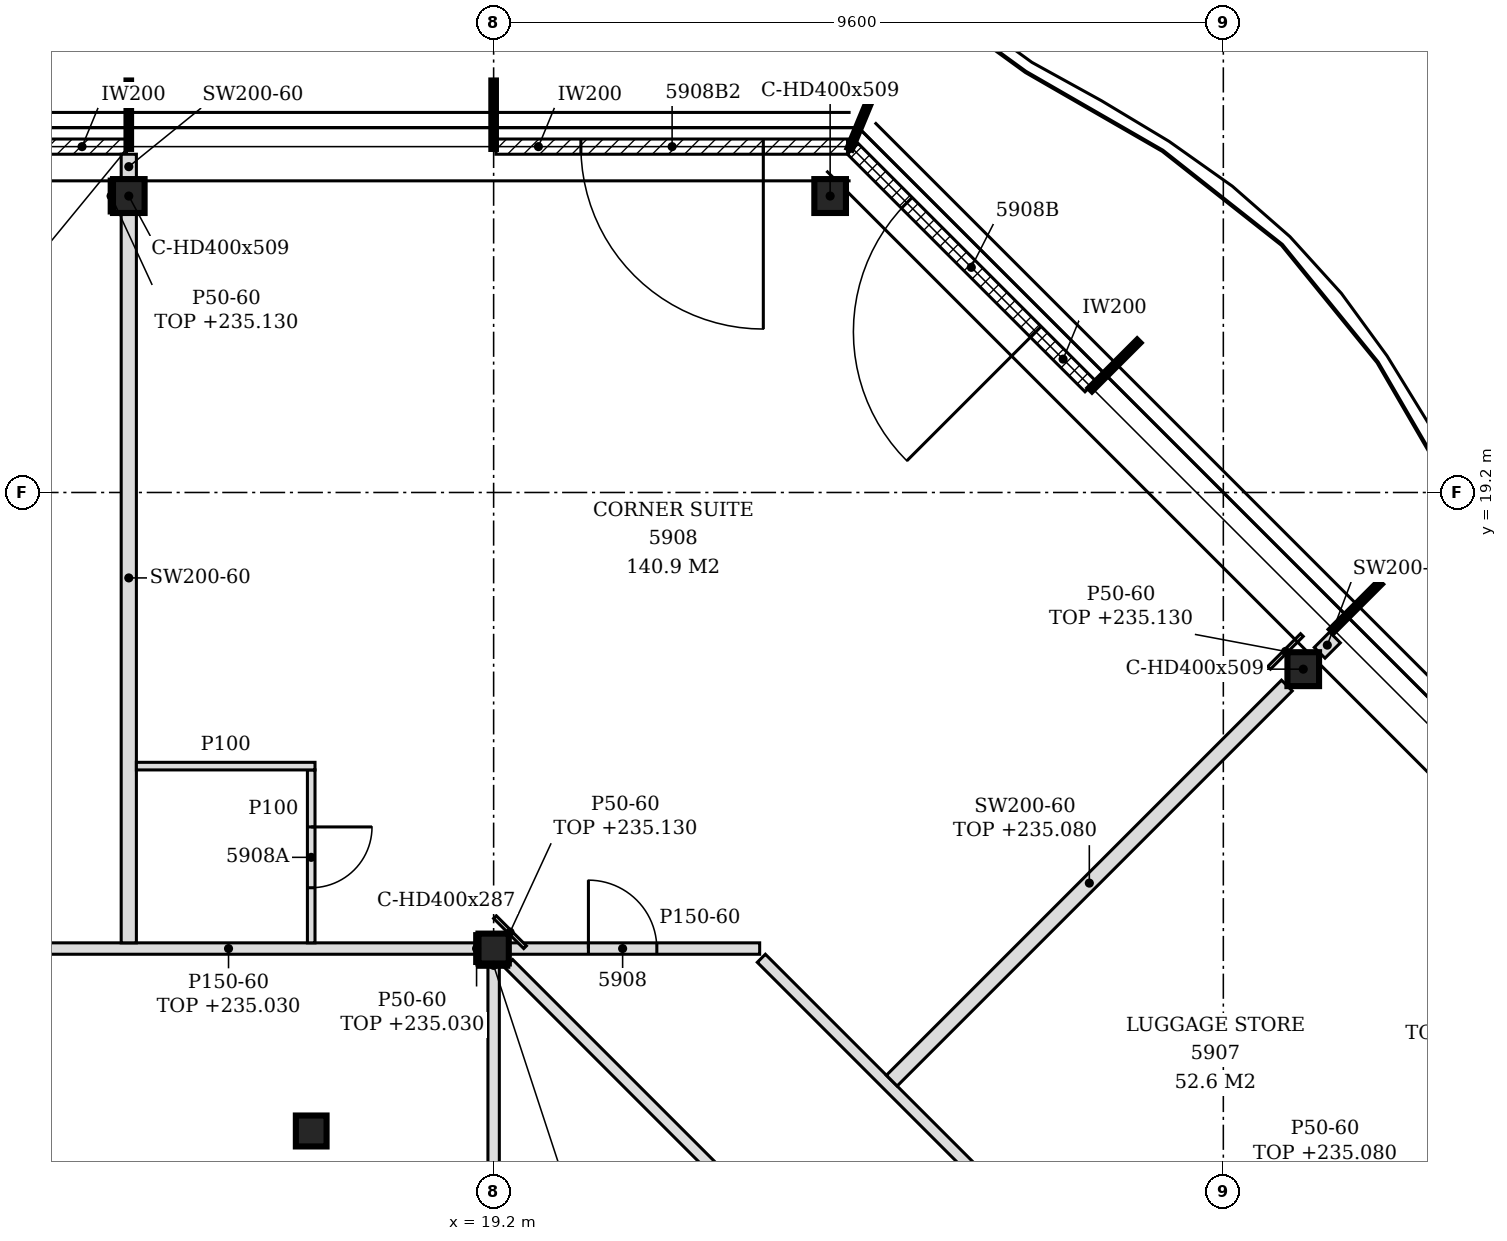
"""IFC4 building model, lengths in metres.
Left out: names, types, materials, properties, quantities, classifications, styles, units other than length and angle.
Written with IfcOpenShell. Run it as: python <this file> out.ifc"""

import sys

from ifc_helpers import new_model, si_unit, direction, frame, frame_2d, origin, origin_2d, place, context, subcontext, project, spatial, polyline, rectangle, i_section, outline, extrude, element, fill, save


model = new_model("IFC4")
c1 = context("Model", 3, precision=1e-05, world=origin(), true_north=direction((0.0, 1.0)))
c2 = subcontext(c1, "Body", "Model", "MODEL_VIEW")
j1 = project(units=[si_unit("LENGTHUNIT", "METRE"), si_unit("PLANEANGLEUNIT", "RADIAN")], contexts=[c1])
p1 = place(None, origin())
s1 = spatial("IfcSite", under=j1, at=p1, CompositionType="ELEMENT")
p2 = place(p1, origin())
s2 = spatial("IfcBuilding", under=s1, at=p2, CompositionType="ELEMENT")
p3 = place(p2, frame((0.0, 0.0, 232.2)))
s3 = spatial("IfcBuildingStorey", under=s2, at=p3, CompositionType="ELEMENT", Elevation=232.2)
for number, where, z_axis, x_axis in (
    (1, (29.852, 16.876, -0.15), (0.0, 0.0, 1.0), (1.0, 0.0, 0.0)),
    (2, (23.627, 23.1, -0.15), (0.0, 0.0, 1.0), (1.0, 0.0, 0.0)),
    (3, (14.4, 23.1, -0.15), (0.0, 0.0, 1.0), (1.0, 0.0, 0.0)),
):
    element("IfcColumn", number, at=place(p3, frame(where, z_axis=z_axis, x_axis=x_axis)), inside=s3, PredefinedType="COLUMN", context=c2, shape_type="SweptSolid", body=[
        extrude(i_section(OverallWidth=0.416, OverallDepth=0.446, WebThickness=0.039, FlangeThickness=0.063, FilletRadius=0.015, at=origin_2d()), origin(), (0.0, 0.0, 1.0), 3.6),
    ])
p4 = place(p3, frame((19.2, 13.2, -0.15), z_axis=(0.0, 0.0, 1.0), x_axis=(1.0, 0.0, 0.0)))
e4 = element("IfcColumn", 4, at=p4, inside=s3, PredefinedType="COLUMN", context=c2, shape_type="SweptSolid", body=[
    extrude(i_section(OverallWidth=0.399, OverallDepth=0.393, WebThickness=0.023, FlangeThickness=0.037, FilletRadius=0.015, at=origin_2d()), origin(), (0.0, 0.0, 1.0), 3.6),
])
p5 = place(p3, frame((16.8, 10.8, -0.15), z_axis=(0.0, 0.0, 1.0), x_axis=(1.0, 0.0, 0.0)))
e5 = element("IfcColumn", 5, at=p5, inside=s3, PredefinedType="COLUMN", context=c2, shape_type="SweptSolid", body=[
    extrude(i_section(OverallWidth=0.404, OverallDepth=0.407, WebThickness=0.027, FlangeThickness=0.044, FilletRadius=0.015, at=origin_2d()), origin(), (0.0, 0.0, 1.0), 3.6),
])
p6 = place(p3, frame((27.051, 20.596, 0.0), z_axis=(0.0, 0.0, 1.0), x_axis=(-0.707106781187, 0.707106781187, 0.0)))
e6 = element("IfcWall", 6, at=p6, inside=s3, PredefinedType="NOTDEFINED", context=c2, shape_type="SweptSolid", body=[
    extrude(rectangle(XDim=4.421, YDim=0.2, at=frame_2d((2.21, 0.0))), origin(), (0.0, 0.0, 1.0), 3.45),
])
p7 = place(p6, frame((1.015, 0.0, 0.0)))
e7 = element("IfcOpeningElement", 7, at=p7, cuts=e6, PredefinedType="OPENING", context=c2, shape_type="SweptSolid", body=[
    extrude(rectangle(XDim=2.4, YDim=2.4, at=frame_2d((1.2, 1.2))), frame((0.0, 0.11, 0.0), z_axis=(0.0, -1.0, 0.0), x_axis=(1.0, 0.0, 0.0)), (0.0, 0.0, 1.0), 0.22),
])
p8 = place(p3, frame((23.856, 23.75, 0.0), z_axis=(0.0, 0.0, 1.0), x_axis=(-1.0, 0.0, 0.0)))
e8 = element("IfcWall", 8, at=p8, inside=s3, PredefinedType="NOTDEFINED", context=c2, shape_type="SweptSolid", body=[
    extrude(rectangle(XDim=4.626, YDim=0.2, at=frame_2d((2.313, 0.0))), origin(), (0.0, 0.0, 1.0), 3.45),
])
p9 = place(p8, frame((1.108, 0.0, 0.0)))
e9 = element("IfcOpeningElement", 9, at=p9, cuts=e8, PredefinedType="OPENING", context=c2, shape_type="SweptSolid", body=[
    extrude(rectangle(XDim=2.4, YDim=2.4, at=frame_2d((1.2, 1.2))), frame((0.0, 0.11, 0.0), z_axis=(0.0, -1.0, 0.0), x_axis=(1.0, 0.0, 0.0)), (0.0, 0.0, 1.0), 0.22),
])
p10 = place(p3, frame((14.37, 23.75, 0.0), z_axis=(0.0, 0.0, 1.0), x_axis=(-1.0, 0.0, 0.0)))
e10 = element("IfcWall", 10, at=p10, inside=s3, PredefinedType="NOTDEFINED", context=c2, shape_type="SweptSolid", body=[
    extrude(rectangle(XDim=4.74, YDim=0.2, at=frame_2d((2.37, 0.0))), origin(), (0.0, 0.0, 1.0), 3.45),
])
p11 = place(p10, frame((1.17, 0.0, 0.0)))
e11 = element("IfcOpeningElement", 11, at=p11, cuts=e10, PredefinedType="OPENING", context=c2, shape_type="SweptSolid", body=[
    extrude(rectangle(XDim=2.4, YDim=2.4, at=frame_2d((1.2, 1.2))), frame((0.0, 0.11, 0.0), z_axis=(0.0, -1.0, 0.0), x_axis=(1.0, 0.0, 0.0)), (0.0, 0.0, 1.0), 0.22),
])
p12 = place(p3, frame((37.072, -1.278, 0.0), z_axis=(0.0, 0.0, 1.0), x_axis=(-0.707106781187, 0.707106781187, 0.0)))
e12 = element("IfcWall", 12, at=p12, inside=s3, PredefinedType="PARTITIONING", context=c2, shape_type="SweptSolid", body=[
    extrude(rectangle(XDim=20.294, YDim=0.15, at=frame_2d((10.147, 0.0))), origin(), (0.0, 0.0, 1.0), 2.88),
])
p13 = place(p12, frame((3.824, 0.0, 0.0)))
e13 = element("IfcOpeningElement", 13, at=p13, cuts=e12, PredefinedType="OPENING", context=c2, shape_type="SweptSolid", body=[
    extrude(rectangle(XDim=0.9, YDim=2.1, at=frame_2d((0.45, 1.05))), frame((0.0, 0.085, 0.0), z_axis=(0.0, -1.0, 0.0), x_axis=(1.0, 0.0, 0.0)), (0.0, 0.0, 1.0), 0.17),
])
p14 = place(p12, frame((10.042, 0.0, 0.0)))
e14 = element("IfcOpeningElement", 14, at=p14, cuts=e12, PredefinedType="OPENING", context=c2, shape_type="SweptSolid", body=[
    extrude(rectangle(XDim=0.9, YDim=2.1, at=frame_2d((0.45, 1.05))), frame((0.0, 0.085, 0.0), z_axis=(0.0, -1.0, 0.0), x_axis=(1.0, 0.0, 0.0)), (0.0, 0.0, 1.0), 0.17),
])
p15 = place(p12, frame((14.443, 0.0, 0.0)))
e15 = element("IfcOpeningElement", 15, at=p15, cuts=e12, PredefinedType="OPENING", context=c2, shape_type="SweptSolid", body=[
    extrude(rectangle(XDim=0.9, YDim=2.1, at=frame_2d((0.45, 1.05))), frame((0.0, 0.085, 0.0), z_axis=(0.0, -1.0, 0.0), x_axis=(1.0, 0.0, 0.0)), (0.0, 0.0, 1.0), 0.17),
])
p16 = place(p3, frame((31.072, 1.328, 0.0), z_axis=(0.0, 0.0, 1.0), x_axis=(-0.707106781187, 0.707106781187, 0.0)))
e16 = element("IfcWall", 16, at=p16, inside=s3, PredefinedType="PARTITIONING", context=c2, shape_type="SweptSolid", body=[
    extrude(rectangle(XDim=16.51, YDim=0.15, at=frame_2d((8.255, 0.0))), origin(), (0.0, 0.0, 1.0), 2.88),
])
p17 = place(p16, frame((7.854, 0.0, 0.0)))
e17 = element("IfcOpeningElement", 17, at=p17, cuts=e16, PredefinedType="OPENING", context=c2, shape_type="SweptSolid", body=[
    extrude(rectangle(XDim=0.9, YDim=2.1, at=frame_2d((0.45, 1.05))), frame((0.0, 0.085, 0.0), z_axis=(0.0, -1.0, 0.0), x_axis=(1.0, 0.0, 0.0)), (0.0, 0.0, 1.0), 0.17),
])
p18 = place(p3, frame((19.2, 2.596, 0.0), z_axis=(0.0, 0.0, 1.0), x_axis=(0.0, 1.0, 0.0)))
e18 = element("IfcWall", 18, at=p18, inside=s3, PredefinedType="PARTITIONING", context=c2, shape_type="SweptSolid", body=[
    extrude(rectangle(XDim=10.407, YDim=0.15, at=frame_2d((5.204, 0.0))), origin(), (0.0, 0.0, 1.0), 2.83),
])
p19 = place(p3, frame((30.662, 5.238, 0.0), z_axis=(0.0, 0.0, 1.0), x_axis=(0.707106781187, 0.707106781187, 0.0)))
e19 = element("IfcWall", 19, at=p19, inside=s3, PredefinedType="PARTITIONING", context=c2, shape_type="SweptSolid", body=[
    extrude(rectangle(XDim=7.351, YDim=0.2, at=frame_2d((3.676, 0.0))), origin(), (0.0, 0.0, 1.0), 2.93),
])
p20 = place(p3, frame((31.398, 9.798, 0.0), z_axis=(0.0, 0.0, 1.0), x_axis=(0.707133900936, 0.707079660397, 0.0)))
e20 = element("IfcWall", 20, at=p20, inside=s3, PredefinedType="PARTITIONING", context=c2, shape_type="SweptSolid", body=[
    extrude(rectangle(XDim=4.501, YDim=0.2, at=frame_2d((2.25, 0.0))), origin(), (0.0, 0.0, 1.0), 2.63),
])
p21 = place(p3, frame((24.438, 11.462, 0.0), z_axis=(0.0, 0.0, 1.0), x_axis=(0.707090175614, 0.707123386369, 0.0)))
e21 = element("IfcWall", 21, at=p21, inside=s3, PredefinedType="PARTITIONING", context=c2, shape_type="SweptSolid", body=[
    extrude(rectangle(XDim=7.351, YDim=0.2, at=frame_2d((3.676, 0.0))), origin(), (0.0, 0.0, 1.0), 2.88),
])
p22 = place(p3, frame((7.399, 13.2, 0.0), z_axis=(0.0, 0.0, 1.0), x_axis=(1.0, 0.0, 0.0)))
e22 = element("IfcWall", 22, at=p22, inside=s3, PredefinedType="PARTITIONING", context=c2, shape_type="SweptSolid", body=[
    extrude(rectangle(XDim=11.601, YDim=0.15, at=frame_2d((5.801, 0.0))), origin(), (0.0, 0.0, 1.0), 2.83),
])
p23 = place(p22, frame((3.225, 0.0, 0.0)))
e23 = element("IfcOpeningElement", 23, at=p23, cuts=e22, PredefinedType="OPENING", context=c2, shape_type="SweptSolid", body=[
    extrude(rectangle(XDim=1.8, YDim=2.1, at=frame_2d((0.9, 1.05))), frame((0.0, 0.085, 0.0), z_axis=(0.0, -1.0, 0.0), x_axis=(1.0, 0.0, 0.0)), (0.0, 0.0, 1.0), 0.17),
])
p24 = place(p3, frame((19.399, 13.2, 0.0), z_axis=(0.0, 0.0, 1.0), x_axis=(1.0, 0.0, 0.0)))
e24 = element("IfcWall", 24, at=p24, inside=s3, PredefinedType="PARTITIONING", context=c2, shape_type="SweptSolid", body=[
    extrude(rectangle(XDim=3.301, YDim=0.15, at=frame_2d((1.65, 0.0))), origin(), (0.0, 0.0, 1.0), 3.45),
])
p25 = place(p24, frame((1.048, 0.0, 0.0)))
e25 = element("IfcOpeningElement", 25, at=p25, cuts=e24, PredefinedType="OPENING", context=c2, shape_type="SweptSolid", body=[
    extrude(rectangle(XDim=0.9, YDim=2.1, at=frame_2d((0.45, 1.05))), frame((0.0, 0.085, 0.0), z_axis=(0.0, -1.0, 0.0), x_axis=(1.0, 0.0, 0.0)), (0.0, 0.0, 1.0), 0.17),
])
p26 = place(p3, frame((14.4, 13.275, 0.0), z_axis=(0.0, 0.0, 1.0), x_axis=(0.0, 1.0, 0.0)))
e26 = element("IfcWall", 26, at=p26, inside=s3, PredefinedType="PARTITIONING", context=c2, shape_type="SweptSolid", body=[
    extrude(outline(polyline([(0.0, 0.0), (9.602, 0.0), (9.602, 3.45), (6.03, 3.45), (6.028, 2.88), (5.82, 2.88), (5.818, 3.45), (0.075, 3.45), (0.073, 2.83), (0.0, 2.83), (0.0, 0.0)])), frame((0.0, 0.1, 0.0), z_axis=(0.0, -1.0, 0.0), x_axis=(1.0, 0.0, 0.0)), (0.0, 0.0, 1.0), 0.2),
])
p27 = place(p3, frame((16.8, 13.275, 0.0), z_axis=(0.0, 0.0, 1.0), x_axis=(0.0, 1.0, 0.0)))
e27 = element("IfcWall", 27, at=p27, inside=s3, PredefinedType="PARTITIONING", context=c2, shape_type="SweptSolid", body=[
    extrude(outline(polyline([(0.0, 0.0), (2.275, 0.0), (2.275, 3.45), (0.075, 3.45), (0.073, 2.83), (0.0, 2.83), (0.0, 0.0)])), frame((0.0, 0.05, 0.0), z_axis=(0.0, -1.0, 0.0), x_axis=(1.0, 0.0, 0.0)), (0.0, 0.0, 1.0), 0.1),
])
p28 = place(p27, frame((0.725, 0.0, 0.0)))
e28 = element("IfcOpeningElement", 28, at=p28, cuts=e27, PredefinedType="OPENING", context=c2, shape_type="SweptSolid", body=[
    extrude(rectangle(XDim=0.8, YDim=2.1, at=frame_2d((0.4, 1.05))), frame((0.0, 0.06, 0.0), z_axis=(0.0, -1.0, 0.0), x_axis=(1.0, 0.0, 0.0)), (0.0, 0.0, 1.0), 0.12),
])
p29 = place(p3, frame((14.5, 15.6, 0.0), z_axis=(0.0, 0.0, 1.0), x_axis=(1.0, 0.0, 0.0)))
e29 = element("IfcWall", 29, at=p29, inside=s3, PredefinedType="PARTITIONING", context=c2, shape_type="SweptSolid", body=[
    extrude(rectangle(XDim=2.35, YDim=0.1, at=frame_2d((1.175, 0.0))), origin(), (0.0, 0.0, 1.0), 3.45),
])
p30 = place(p3, frame((30.067, 17.091, 0.0), z_axis=(0.0, 0.0, 1.0), x_axis=(0.707106781187, 0.707106781187, 0.0)))
e30 = element("IfcWall", 30, at=p30, inside=s3, PredefinedType="PARTITIONING", context=c2, shape_type="SweptSolid", body=[
    extrude(rectangle(XDim=0.285, YDim=0.2, at=frame_2d((0.143, 0.0))), origin(), (0.0, 0.0, 1.0), 3.45),
])
p31 = place(p3, frame((14.4, 23.323, 0.0), z_axis=(0.0, 0.0, 1.0), x_axis=(0.0, 1.0, 0.0)))
e31 = element("IfcWall", 31, at=p31, inside=s3, PredefinedType="PARTITIONING", context=c2, shape_type="SweptSolid", body=[
    extrude(rectangle(XDim=0.327, YDim=0.2, at=frame_2d((0.164, 0.0))), origin(), (0.0, 0.0, 1.0), 3.45),
])
p32 = place(p3, frame((18.976, 13.003, 0.0), z_axis=(0.0, 0.0, 1.0), x_axis=(0.0, 1.0, 0.0)))
e32 = element("IfcWall", 32, at=p32, inside=s3, PredefinedType="PARTITIONING", context=c2, shape_type="SweptSolid", body=[
    extrude(rectangle(XDim=0.393, YDim=0.05, at=frame_2d((0.197, 0.0))), origin(), (0.0, 0.0, 1.0), 2.83),
])
p33 = place(p3, frame((19.614, 13.218, 0.0), z_axis=(0.0, 0.0, 1.0), x_axis=(-0.707106781187, 0.707106781187, 0.0)))
e33 = element("IfcWall", 33, at=p33, inside=s3, PredefinedType="PARTITIONING", context=c2, shape_type="SweptSolid", body=[
    extrude(rectangle(XDim=0.56, YDim=0.05, at=frame_2d((0.28, 0.0))), origin(), (0.0, 0.0, 1.0), 2.93),
])
p34 = place(p3, frame((29.403, 16.893, 0.0), z_axis=(0.0, 0.0, 1.0), x_axis=(0.706906496032, 0.707307009627, 0.0)))
e34 = element("IfcWall", 34, at=p34, inside=s3, PredefinedType="PARTITIONING", context=c2, shape_type="SweptSolid", body=[
    extrude(rectangle(XDim=0.61, YDim=0.05, at=frame_2d((0.305, 0.0))), origin(), (0.0, 0.0, 1.0), 2.93),
])
p35 = place(p3, frame((19.0, 12.979, 0.0), z_axis=(0.0, 0.0, 1.0), x_axis=(1.0, 0.0, 0.0)))
e35 = element("IfcWall", 35, at=p35, inside=s3, PredefinedType="PARTITIONING", context=c2, shape_type="SweptSolid", body=[
    extrude(rectangle(XDim=0.399, YDim=0.05, at=frame_2d((0.199, 0.0))), origin(), (0.0, 0.0, 1.0), 2.83),
])
p36 = place(p3, frame((14.167, 22.877, 0.0), z_axis=(0.0, 0.0, 1.0), x_axis=(0.0, 1.0, 0.0)))
e36 = element("IfcWall", 36, at=p36, inside=s3, PredefinedType="PARTITIONING", context=c2, shape_type="SweptSolid", body=[
    extrude(rectangle(XDim=0.446, YDim=0.05, at=frame_2d((0.223, 0.0))), origin(), (0.0, 0.0, 1.0), 2.93),
])
p37 = place(p7, origin())
e37 = element("IfcDoor", 37, at=p37, inside=s3, OperationType="SINGLE_SWING_LEFT", PredefinedType="DOOR", context=c2, shape_type="SweptSolid", body=[
    extrude(rectangle(XDim=2.4, YDim=2.4, at=frame_2d((1.2, 1.2))), frame((0.0, 0.025, 0.0), z_axis=(0.0, -1.0, 0.0), x_axis=(1.0, 0.0, 0.0)), (0.0, 0.0, 1.0), 0.05),
])
fill(e7, e37)
p38 = place(p9, origin())
e38 = element("IfcDoor", 38, at=p38, inside=s3, OperationType="SINGLE_SWING_LEFT", PredefinedType="DOOR", context=c2, shape_type="SweptSolid", body=[
    extrude(rectangle(XDim=2.4, YDim=2.4, at=frame_2d((1.2, 1.2))), frame((0.0, 0.025, 0.0), z_axis=(0.0, -1.0, 0.0), x_axis=(1.0, 0.0, 0.0)), (0.0, 0.0, 1.0), 0.05),
])
fill(e9, e38)
p39 = place(p25, origin())
e39 = element("IfcDoor", 39, at=p39, inside=s3, OperationType="SINGLE_SWING_LEFT", PredefinedType="DOOR", context=c2, shape_type="SweptSolid", body=[
    extrude(rectangle(XDim=0.9, YDim=2.1, at=frame_2d((0.45, 1.05))), frame((0.0, 0.025, 0.0), z_axis=(0.0, -1.0, 0.0), x_axis=(1.0, 0.0, 0.0)), (0.0, 0.0, 1.0), 0.05),
])
fill(e25, e39)
p40 = place(p28, frame((0.8, 0.0, 0.0), z_axis=(0.0, 0.0, 1.0), x_axis=(-1.0, 0.0, 0.0)))
e40 = element("IfcDoor", 40, at=p40, inside=s3, OperationType="SINGLE_SWING_LEFT", PredefinedType="DOOR", context=c2, shape_type="SweptSolid", body=[
    extrude(rectangle(XDim=0.8, YDim=2.1, at=frame_2d((0.4, 1.05))), frame((0.0, 0.025, 0.0), z_axis=(0.0, -1.0, 0.0), x_axis=(1.0, 0.0, 0.0)), (0.0, 0.0, 1.0), 0.05),
])
fill(e28, e40)
save(model, sys.argv[1])
